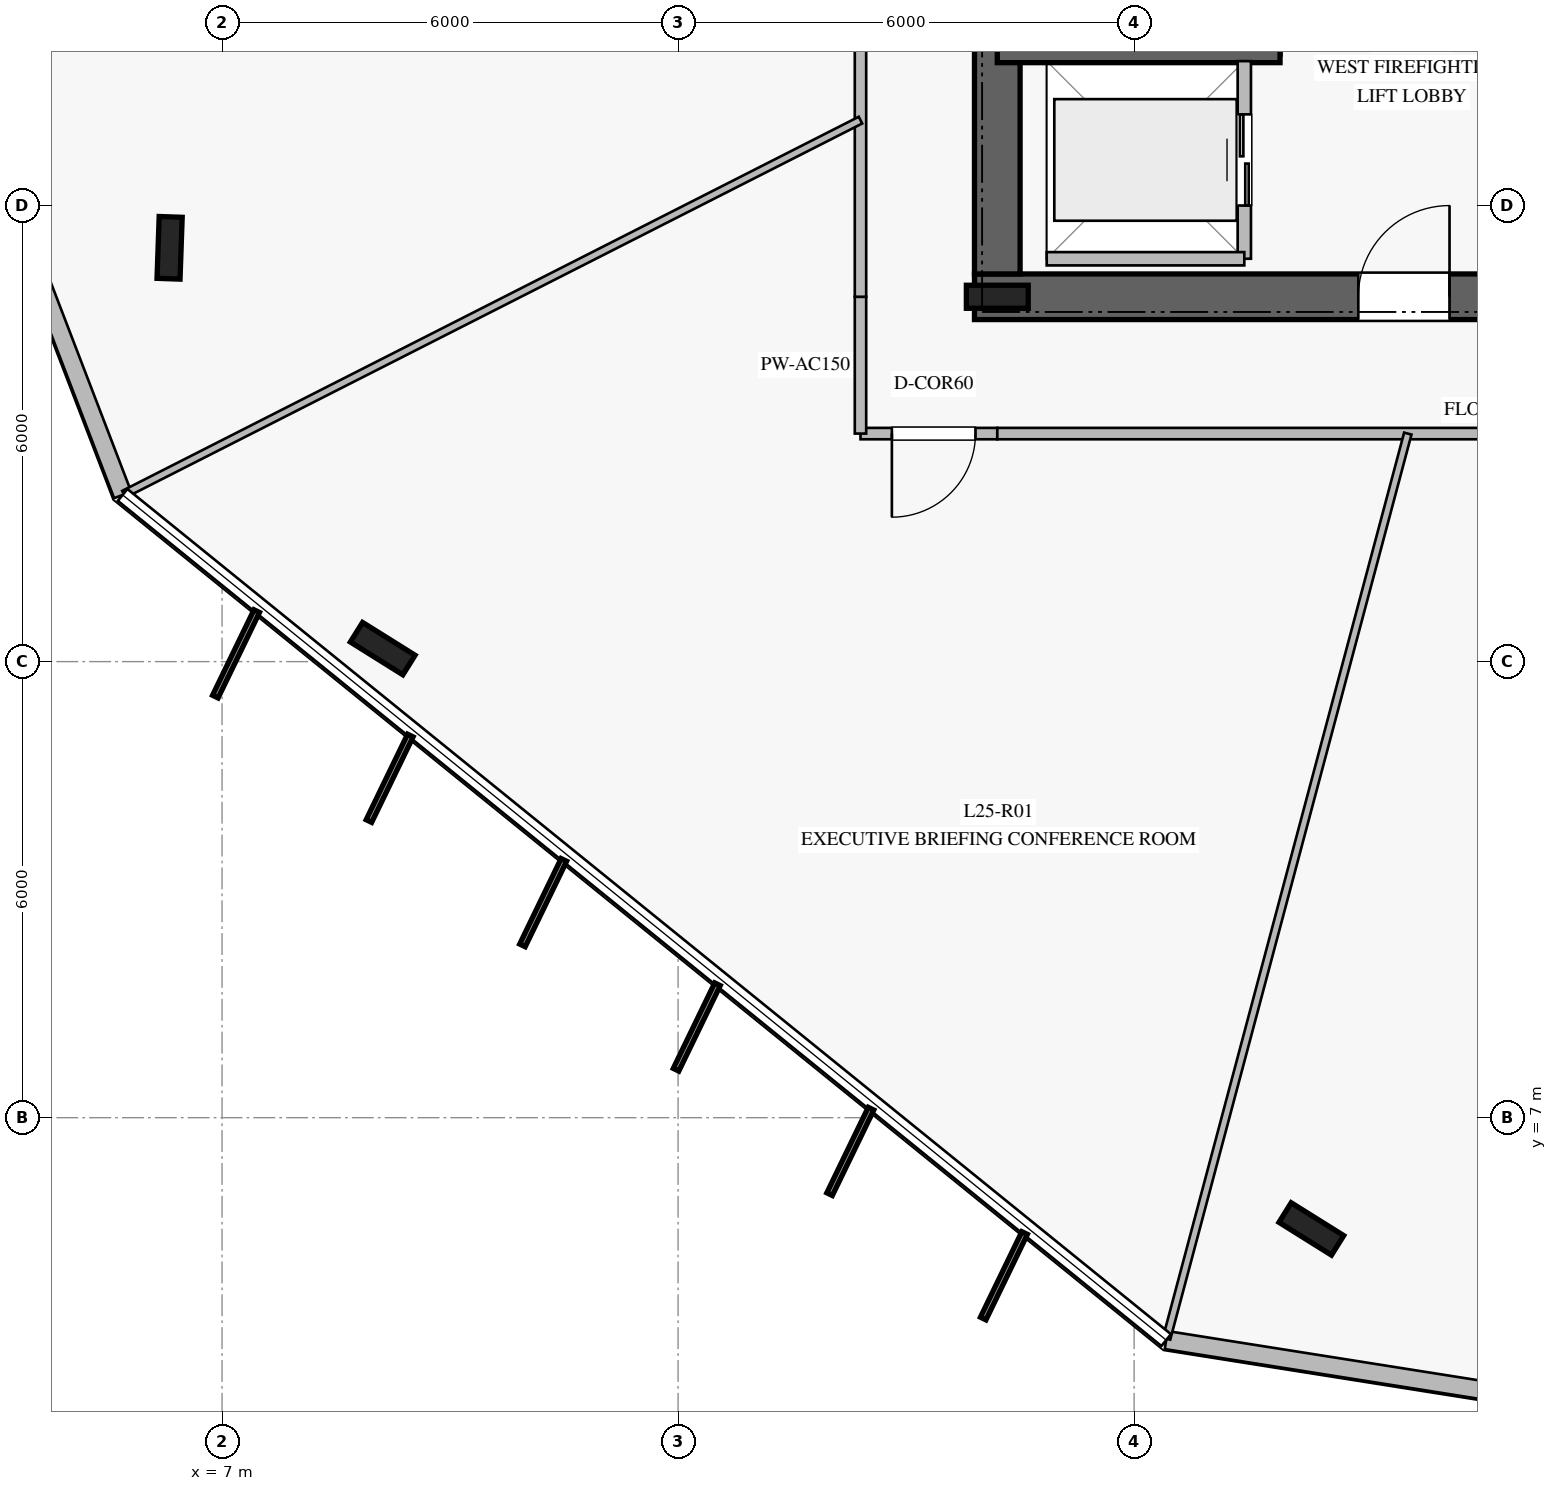
"""IFC4 building model, lengths in metres.
Left out: names, types, materials, properties, quantities, classifications, styles, units other than length and angle.
Written with IfcOpenShell. Run it as: python <this file> out.ifc"""

import sys

from ifc_helpers import new_model, si_unit, direction, frame, frame_2d, origin, origin_2d, place, context, subcontext, project, spatial, rectangle, i_section, extrude, element, fill, save


model = new_model("IFC4")
c1 = context("Model", 3, precision=1e-05, world=origin(), true_north=direction((0.0, 1.0)))
c2 = subcontext(c1, "Body", "Model", "MODEL_VIEW")
j1 = project(units=[si_unit("LENGTHUNIT", "METRE"), si_unit("PLANEANGLEUNIT", "RADIAN")], contexts=[c1])
p1 = place(None, origin())
s1 = spatial("IfcSite", under=j1, at=p1, CompositionType="ELEMENT")
p2 = place(p1, origin())
s2 = spatial("IfcBuilding", under=s1, at=p2, CompositionType="ELEMENT")
p3 = place(p2, frame((0.0, 0.0, 106.4)))
s3 = spatial("IfcBuildingStorey", under=s2, at=p3, CompositionType="ELEMENT", Elevation=106.4)
p4 = place(p3, frame((16.9, 17.8, 0.0), z_axis=(0.0, 0.0, 1.0), x_axis=(1.0, 0.0, 0.0)))
e1 = element("IfcWall", 1, at=p4, inside=s3, PredefinedType="SHEAR", context=c2, shape_type="SweptSolid", body=[
    extrude(rectangle(XDim=16.2, YDim=0.6, at=frame_2d((8.1, 0.0))), origin(), (0.0, 0.0, 1.0), 3.76),
])
p5 = place(p4, frame((5.05, 0.0, 0.0)))
e2 = element("IfcOpeningElement", 2, at=p5, cuts=e1, PredefinedType="OPENING", context=c2, shape_type="SweptSolid", body=[
    extrude(rectangle(XDim=1.2, YDim=2.25, at=frame_2d((0.6, 1.125))), frame((0.0, 0.31, 0.0), z_axis=(0.0, -1.0, 0.0), x_axis=(1.0, 0.0, 0.0)), (0.0, 0.0, 1.0), 0.62),
])
p6 = place(p4, frame((14.0, 0.0, 0.0)))
e3 = element("IfcOpeningElement", 3, at=p6, cuts=e1, PredefinedType="OPENING", context=c2, shape_type="SweptSolid", body=[
    extrude(rectangle(XDim=0.9, YDim=2.1, at=frame_2d((0.45, 1.05))), frame((0.0, 0.31, 0.0), z_axis=(0.0, -1.0, 0.0), x_axis=(1.0, 0.0, 0.0)), (0.0, 0.0, 1.0), 0.62),
])
p7 = place(p4, frame((9.875, 0.0, 0.0)))
e4 = element("IfcOpeningElement", 4, at=p7, cuts=e1, PredefinedType="OPENING", context=c2, shape_type="SweptSolid", body=[
    extrude(rectangle(XDim=1.1, YDim=2.2, at=frame_2d((0.55, 1.1))), frame((0.0, 0.31, 0.0), z_axis=(0.0, -1.0, 0.0), x_axis=(1.0, 0.0, 0.0)), (0.0, 0.0, 1.0), 0.62),
])
p8 = place(p3, frame((17.2, 31.9, 0.0), z_axis=(0.0, 0.0, 1.0), x_axis=(0.0, -1.0, 0.0)))
e5 = element("IfcWall", 5, at=p8, inside=s3, PredefinedType="SHEAR", context=c2, shape_type="SweptSolid", body=[
    extrude(rectangle(XDim=13.8, YDim=0.6, at=frame_2d((6.9, 0.0))), origin(), (0.0, 0.0, 1.0), 3.76),
])
p9 = place(p8, frame((2.05, 0.0, 0.0)))
e6 = element("IfcOpeningElement", 6, at=p9, cuts=e5, PredefinedType="OPENING", context=c2, shape_type="SweptSolid", body=[
    extrude(rectangle(XDim=1.5, YDim=2.2, at=frame_2d((0.75, 1.1))), frame((0.0, 0.31, 0.0), z_axis=(0.0, -1.0, 0.0), x_axis=(1.0, 0.0, 0.0)), (0.0, 0.0, 1.0), 0.62),
])
p10 = place(p3, frame((17.2, 17.8, 0.0), z_axis=(0.0, 0.0, 1.0), x_axis=(1.0, 0.0, 0.0)))
e7 = element("IfcColumn", 7, at=p10, inside=s3, PredefinedType="COLUMN", context=c2, shape_type="SweptSolid", body=[
    extrude(i_section(OverallWidth=0.303, OverallDepth=0.814, WebThickness=0.021, FlangeThickness=0.04, at=origin_2d()), origin(), (0.0, 0.0, 1.0), 4.0),
])
p11 = place(p3, frame((20.81, 20.99, 0.0), z_axis=(0.0, 0.0, 1.0), x_axis=(0.0, 1.0, 0.0)))
e8 = element("IfcWall", 8, at=p11, inside=s3, PredefinedType="SOLIDWALL", context=c2, shape_type="SweptSolid", body=[
    extrude(rectangle(XDim=7.22, YDim=0.22, at=frame_2d((3.61, 0.0))), origin(), (0.0, 0.0, 1.0), 3.76),
])
p12 = place(p11, frame((0.18, 0.0, 0.0)))
e9 = element("IfcOpeningElement", 9, at=p12, cuts=e8, PredefinedType="OPENING", context=c2, shape_type="SweptSolid", body=[
    extrude(rectangle(XDim=1.15, YDim=2.2, at=frame_2d((0.575, 1.1))), frame((0.0, 0.12, 0.0), z_axis=(0.0, -1.0, 0.0), x_axis=(1.0, 0.0, 0.0)), (0.0, 0.0, 1.0), 0.24),
])
p13 = place(p3, frame((17.2, 20.99, 0.0), z_axis=(0.0, 0.0, 1.0), x_axis=(1.0, 0.0, 0.0)))
e10 = element("IfcWall", 10, at=p13, inside=s3, PredefinedType="SOLIDWALL", context=c2, shape_type="SweptSolid", body=[
    extrude(rectangle(XDim=3.72, YDim=0.22, at=frame_2d((1.86, 0.0))), origin(), (0.0, 0.0, 1.0), 3.76),
])
for number, where, z_axis, x_axis in (
    (11, (6.31, 18.444, 0.0), (0.0, 0.0, 1.0), (0.035, 0.999, 0.0)),
    (12, (9.114, 13.171, 0.0), (0.0, 0.0, 1.0), (-0.848, 0.53, 0.0)),
    (13, (21.332, 5.536, 0.0), (0.0, 0.0, 1.0), (-0.848, 0.53, 0.0)),
):
    element("IfcColumn", number, at=place(p3, frame(where, z_axis=z_axis, x_axis=x_axis)), inside=s3, PredefinedType="COLUMN", context=c2, shape_type="SweptSolid", body=[
        extrude(i_section(OverallWidth=0.303, OverallDepth=0.814, WebThickness=0.021, FlangeThickness=0.04, at=origin_2d()), origin(), (0.0, 0.0, 1.0), 4.0),
    ])
p14 = place(p3, frame((4.089, 19.367, 0.0), z_axis=(0.0, 0.0, 1.0), x_axis=(0.35848504637, -0.933535468811, 0.0)))
e14 = element("IfcWall", 14, at=p14, inside=s3, PredefinedType="STANDARD", context=c2, shape_type="SweptSolid", body=[
    extrude(rectangle(XDim=4.471, YDim=0.24, at=frame_2d((2.235, 0.0))), origin(), (0.0, 0.0, 1.0), 3.76),
])
p15 = place(p3, frame((19.422, 4.074, 0.0), z_axis=(0.0, 0.0, 1.0), x_axis=(0.987709346229, -0.156301783012, 0.0)))
e15 = element("IfcWall", 15, at=p15, inside=s3, PredefinedType="STANDARD", context=c2, shape_type="SweptSolid", body=[
    extrude(rectangle(XDim=4.472, YDim=0.24, at=frame_2d((2.236, 0.0))), origin(), (0.0, 0.0, 1.0), 3.76),
])
p16 = place(p3, frame((20.45, 18.3, 0.0), z_axis=(0.0, 0.0, 1.0), x_axis=(0.0, 1.0, 0.0)))
e16 = element("IfcWall", 16, at=p16, inside=s3, PredefinedType="PARTITIONING", context=c2, shape_type="SweptSolid", body=[
    extrude(rectangle(XDim=2.6, YDim=0.175, at=frame_2d((1.3, 0.0))), origin(), (0.0, 0.0, 1.0), 3.76),
])
p17 = place(p16, frame((0.7, 0.0, 0.0)))
e17 = element("IfcOpeningElement", 17, at=p17, cuts=e16, PredefinedType="OPENING", context=c2, shape_type="SweptSolid", body=[
    extrude(rectangle(XDim=1.2, YDim=2.2, at=frame_2d((0.6, 1.1))), frame((0.0, 0.098, 0.0), z_axis=(0.0, -1.0, 0.0), x_axis=(1.0, 0.0, 0.0)), (0.0, 0.0, 1.0), 0.195),
])
p18 = place(p3, frame((17.85, 18.3, 0.0), z_axis=(0.0, 0.0, 1.0), x_axis=(1.0, 0.0, 0.0)))
e18 = element("IfcWall", 18, at=p18, inside=s3, PredefinedType="PARTITIONING", context=c2, shape_type="SweptSolid", body=[
    extrude(rectangle(XDim=2.6, YDim=0.175, at=frame_2d((1.3, 0.0))), origin(), (0.0, 0.0, 1.0), 3.76),
])
p19 = place(p3, frame((17.2, 16.0, 0.0), z_axis=(0.0, 0.0, 1.0), x_axis=(-1.0, 0.0, 0.0)))
e19 = element("IfcWall", 19, at=p19, inside=s3, PredefinedType="PARTITIONING", context=c2, shape_type="SweptSolid", body=[
    extrude(rectangle(XDim=1.8, YDim=0.15, at=frame_2d((0.9, 0.0))), origin(), (0.0, 0.0, 1.0), 3.36),
])
p20 = place(p19, frame((0.287, 0.0, 0.0)))
e20 = element("IfcOpeningElement", 20, at=p20, cuts=e19, PredefinedType="OPENING", context=c2, shape_type="SweptSolid", body=[
    extrude(rectangle(XDim=1.1, YDim=2.2, at=frame_2d((0.55, 1.1))), frame((0.0, 0.085, 0.0), z_axis=(0.0, -1.0, 0.0), x_axis=(1.0, 0.0, 0.0)), (0.0, 0.0, 1.0), 0.17),
])
p21 = place(p3, frame((15.4, 16.0, 0.0), z_axis=(0.0, 0.0, 1.0), x_axis=(0.0, 1.0, 0.0)))
e21 = element("IfcWall", 21, at=p21, inside=s3, PredefinedType="PARTITIONING", context=c2, shape_type="SweptSolid", body=[
    extrude(rectangle(XDim=1.8, YDim=0.15, at=frame_2d((0.9, 0.0))), origin(), (0.0, 0.0, 1.0), 3.21),
])
p22 = place(p3, frame((15.4, 17.8, 0.0), z_axis=(0.0, 0.0, 1.0), x_axis=(0.0, 1.0, 0.0)))
e22 = element("IfcWall", 22, at=p22, inside=s3, PredefinedType="PARTITIONING", context=c2, shape_type="SweptSolid", body=[
    extrude(rectangle(XDim=6.25, YDim=0.15, at=frame_2d((3.125, 0.0))), origin(), (0.0, 0.0, 1.0), 3.21),
])
p23 = place(p22, frame((3.451, 0.0, 0.0)))
e23 = element("IfcOpeningElement", 23, at=p23, cuts=e22, PredefinedType="OPENING", context=c2, shape_type="SweptSolid", body=[
    extrude(rectangle(XDim=1.1, YDim=2.2, at=frame_2d((0.55, 1.1))), frame((0.0, 0.085, 0.0), z_axis=(0.0, -1.0, 0.0), x_axis=(1.0, 0.0, 0.0)), (0.0, 0.0, 1.0), 0.17),
])
p24 = place(p3, frame((24.05, 16.0, 0.0), z_axis=(0.0, 0.0, 1.0), x_axis=(-1.0, 0.0, 0.0)))
e24 = element("IfcWall", 24, at=p24, inside=s3, PredefinedType="PARTITIONING", context=c2, shape_type="SweptSolid", body=[
    extrude(rectangle(XDim=6.85, YDim=0.15, at=frame_2d((3.425, 0.0))), origin(), (0.0, 0.0, 1.0), 3.21),
])
p25 = place(p3, frame((15.4, 20.124, 0.0), z_axis=(0.0, 0.0, 1.0), x_axis=(-0.891588225001, -0.452847034923, 0.0)))
e25 = element("IfcWall", 25, at=p25, inside=s3, PredefinedType="MOVABLE", context=c2, shape_type="SweptSolid", body=[
    extrude(rectangle(XDim=10.869, YDim=0.1, at=frame_2d((5.435, 0.0))), origin(), (0.0, 0.0, 1.0), 3.02),
])
p26 = place(p3, frame((22.601, 16.0, 0.0), z_axis=(0.0, 0.0, 1.0), x_axis=(-0.257557841834, -0.966262882506, 0.0)))
e26 = element("IfcWall", 26, at=p26, inside=s3, PredefinedType="MOVABLE", context=c2, shape_type="SweptSolid", body=[
    extrude(rectangle(XDim=12.324, YDim=0.1, at=frame_2d((6.162, 0.0))), origin(), (0.0, 0.0, 1.0), 3.16),
])
p27 = place(p5, origin())
e27 = element("IfcDoor", 27, at=p27, inside=s3, OperationType="SINGLE_SWING_RIGHT", PredefinedType="DOOR", context=c2, shape_type="SweptSolid", body=[
    extrude(rectangle(XDim=1.2, YDim=2.25, at=frame_2d((0.6, 1.125))), frame((0.0, 0.025, 0.0), z_axis=(0.0, -1.0, 0.0), x_axis=(1.0, 0.0, 0.0)), (0.0, 0.0, 1.0), 0.05),
])
fill(e2, e27)
p28 = place(p17, origin())
e28 = element("IfcDoor", 28, at=p28, inside=s3, OperationType="DOUBLE_DOOR_SLIDING", PredefinedType="DOOR", context=c2, shape_type="SweptSolid", body=[
    extrude(rectangle(XDim=1.2, YDim=2.2, at=frame_2d((0.6, 1.1))), frame((0.0, 0.025, 0.0), z_axis=(0.0, -1.0, 0.0), x_axis=(1.0, 0.0, 0.0)), (0.0, 0.0, 1.0), 0.05),
])
fill(e17, e28)
p29 = place(p20, origin())
e29 = element("IfcDoor", 29, at=p29, inside=s3, OperationType="SINGLE_SWING_RIGHT", PredefinedType="DOOR", context=c2, shape_type="SweptSolid", body=[
    extrude(rectangle(XDim=1.1, YDim=2.2, at=frame_2d((0.55, 1.1))), frame((0.0, 0.025, 0.0), z_axis=(0.0, -1.0, 0.0), x_axis=(1.0, 0.0, 0.0)), (0.0, 0.0, 1.0), 0.05),
])
fill(e20, e29)
save(model, sys.argv[1])
